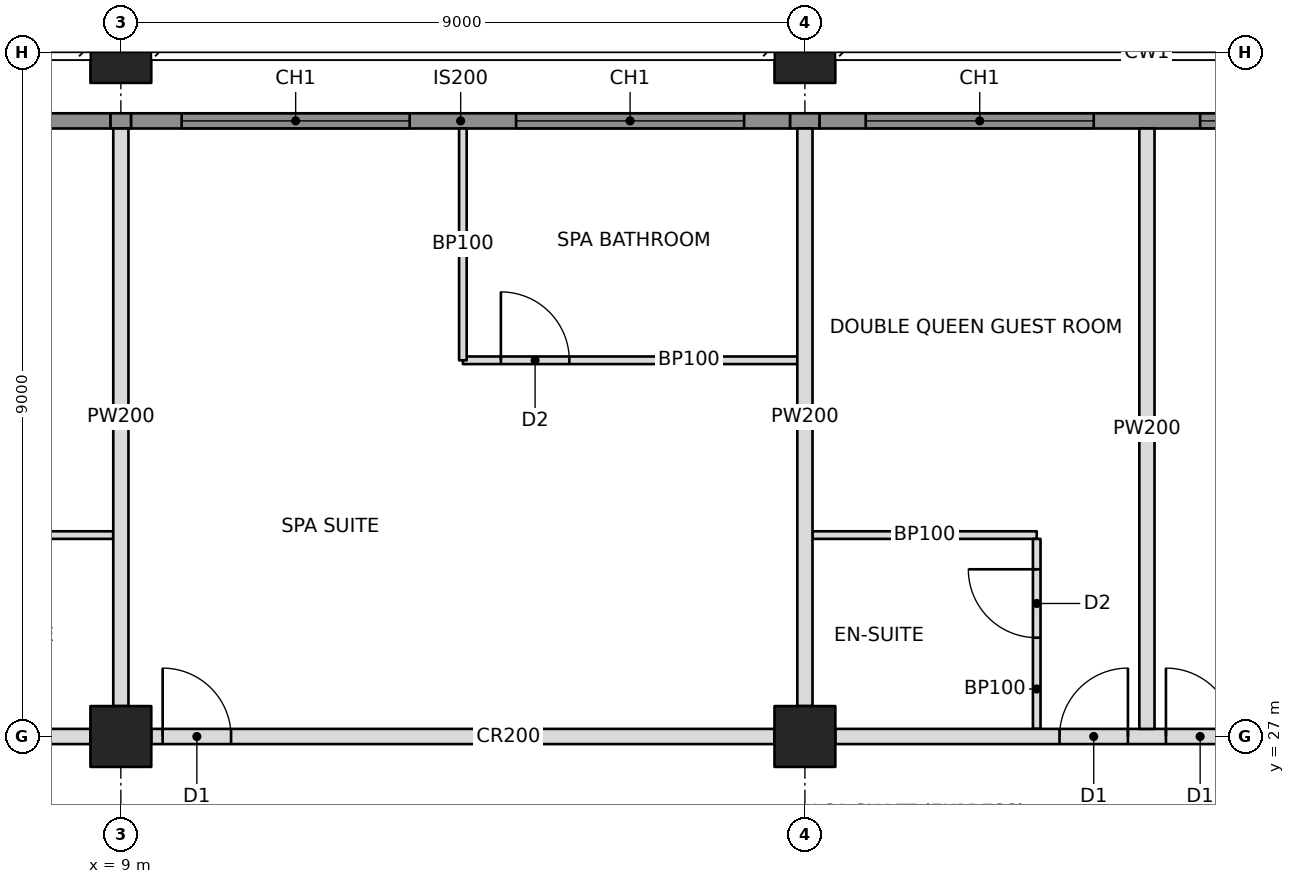
"""IFC4 building model, lengths in metres.
Left out: names, types, materials, properties, quantities, classifications, styles, units other than length and angle.
Written with IfcOpenShell. Run it as: python <this file> out.ifc"""

import sys

from ifc_helpers import new_model, si_unit, direction, frame, frame_2d, origin, origin_2d, place, context, subcontext, project, spatial, rectangle, hollow_rectangle, extrude, element, fill, save


model = new_model("IFC4")
c1 = context("Model", 3, precision=1e-05, world=origin(), true_north=direction((0.0, 1.0)))
c2 = subcontext(c1, "Body", "Model", "MODEL_VIEW")
j1 = project(units=[si_unit("LENGTHUNIT", "METRE"), si_unit("PLANEANGLEUNIT", "RADIAN")], contexts=[c1])
p1 = place(None, origin())
s1 = spatial("IfcSite", under=j1, at=p1, CompositionType="ELEMENT")
p2 = place(p1, origin())
s2 = spatial("IfcBuilding", under=s1, at=p2, CompositionType="ELEMENT")
p3 = place(p2, frame((0.0, 0.0, 148.6)))
s3 = spatial("IfcBuildingStorey", under=s2, at=p3, CompositionType="ELEMENT", Elevation=148.6)
p4 = place(p3, frame((9.0, 27.0, 0.0), z_axis=(0.0, 0.0, 1.0), x_axis=(1.0, 0.0, 0.0)))
e1 = element("IfcColumn", 1, at=p4, inside=s3, PredefinedType="COLUMN", context=c2, shape_type="SweptSolid", body=[
    extrude(hollow_rectangle(XDim=0.8, YDim=0.8, WallThickness=0.07, at=origin_2d()), origin(), (0.0, 0.0, 1.0), 3.4),
])
p5 = place(p3, frame((9.0, 36.0, 0.0), z_axis=(0.0, 0.0, 1.0), x_axis=(1.0, 0.0, 0.0)))
e2 = element("IfcColumn", 2, at=p5, inside=s3, PredefinedType="COLUMN", context=c2, shape_type="SweptSolid", body=[
    extrude(hollow_rectangle(XDim=0.8, YDim=0.8, WallThickness=0.06, at=origin_2d()), origin(), (0.0, 0.0, 1.0), 3.4),
])
p6 = place(p3, frame((18.0, 27.0, 0.0), z_axis=(0.0, 0.0, 1.0), x_axis=(1.0, 0.0, 0.0)))
e3 = element("IfcColumn", 3, at=p6, inside=s3, PredefinedType="COLUMN", context=c2, shape_type="SweptSolid", body=[
    extrude(hollow_rectangle(XDim=0.8, YDim=0.8, WallThickness=0.07, at=origin_2d()), origin(), (0.0, 0.0, 1.0), 3.4),
])
p7 = place(p3, frame((18.0, 36.0, 0.0), z_axis=(0.0, 0.0, 1.0), x_axis=(1.0, 0.0, 0.0)))
e4 = element("IfcColumn", 4, at=p7, inside=s3, PredefinedType="COLUMN", context=c2, shape_type="SweptSolid", body=[
    extrude(hollow_rectangle(XDim=0.8, YDim=0.8, WallThickness=0.06, at=origin_2d()), origin(), (0.0, 0.0, 1.0), 3.4),
])
p8 = place(p3, frame((3.0, 35.1, 0.0), z_axis=(0.0, 0.0, 1.0), x_axis=(1.0, 0.0, 0.0)))
e5 = element("IfcWall", 5, at=p8, inside=s3, PredefinedType="SOLIDWALL", context=c2, shape_type="SweptSolid", body=[
    extrude(rectangle(XDim=5.865, YDim=0.2, at=frame_2d((2.932, 0.0))), origin(), (0.0, 0.0, 1.0), 3.2),
])
p9 = place(p8, frame((1.45, 0.0, 0.6)))
e6 = element("IfcOpeningElement", 6, at=p9, cuts=e5, PredefinedType="OPENING", context=c2, shape_type="SweptSolid", body=[
    extrude(rectangle(XDim=3.0, YDim=2.2, at=frame_2d((1.5, 1.1))), frame((0.0, 0.11, 0.0), z_axis=(0.0, -1.0, 0.0), x_axis=(1.0, 0.0, 0.0)), (0.0, 0.0, 1.0), 0.22),
])
p10 = place(p3, frame((1.0, 27.0, 0.0), z_axis=(0.0, 0.0, 1.0), x_axis=(1.0, 0.0, 0.0)))
e7 = element("IfcWall", 7, at=p10, inside=s3, PredefinedType="PARTITIONING", context=c2, shape_type="SweptSolid", body=[
    extrude(rectangle(XDim=7.6, YDim=0.2, at=frame_2d((3.8, 0.0))), origin(), (0.0, 0.0, 1.0), 2.438),
])
p11 = place(p10, frame((0.25, 0.0, 0.0)))
e8 = element("IfcOpeningElement", 8, at=p11, cuts=e7, PredefinedType="OPENING", context=c2, shape_type="SweptSolid", body=[
    extrude(rectangle(XDim=0.9, YDim=2.1, at=frame_2d((0.45, 1.05))), frame((0.0, 0.11, 0.0), z_axis=(0.0, -1.0, 0.0), x_axis=(1.0, 0.0, 0.0)), (0.0, 0.0, 1.0), 0.22),
])
p12 = place(p3, frame((9.4, 27.0, 0.0), z_axis=(0.0, 0.0, 1.0), x_axis=(1.0, 0.0, 0.0)))
e9 = element("IfcWall", 9, at=p12, inside=s3, PredefinedType="PARTITIONING", context=c2, shape_type="SweptSolid", body=[
    extrude(rectangle(XDim=8.2, YDim=0.2, at=frame_2d((4.1, 0.0))), origin(), (0.0, 0.0, 1.0), 2.405),
])
p13 = place(p12, frame((0.15, 0.0, 0.0)))
e10 = element("IfcOpeningElement", 10, at=p13, cuts=e9, PredefinedType="OPENING", context=c2, shape_type="SweptSolid", body=[
    extrude(rectangle(XDim=0.9, YDim=2.1, at=frame_2d((0.45, 1.05))), frame((0.0, 0.11, 0.0), z_axis=(0.0, -1.0, 0.0), x_axis=(1.0, 0.0, 0.0)), (0.0, 0.0, 1.0), 0.22),
])
p14 = place(p3, frame((18.4, 27.0, 0.0), z_axis=(0.0, 0.0, 1.0), x_axis=(1.0, 0.0, 0.0)))
e11 = element("IfcWall", 11, at=p14, inside=s3, PredefinedType="PARTITIONING", context=c2, shape_type="SweptSolid", body=[
    extrude(rectangle(XDim=8.2, YDim=0.2, at=frame_2d((4.1, 0.0))), origin(), (0.0, 0.0, 1.0), 2.405),
])
p15 = place(p14, frame((2.95, 0.0, 0.0)))
e12 = element("IfcOpeningElement", 12, at=p15, cuts=e11, PredefinedType="OPENING", context=c2, shape_type="SweptSolid", body=[
    extrude(rectangle(XDim=0.9, YDim=2.1, at=frame_2d((0.45, 1.05))), frame((0.0, 0.11, 0.0), z_axis=(0.0, -1.0, 0.0), x_axis=(1.0, 0.0, 0.0)), (0.0, 0.0, 1.0), 0.22),
])
p16 = place(p14, frame((4.35, 0.0, 0.0)))
e13 = element("IfcOpeningElement", 13, at=p16, cuts=e11, PredefinedType="OPENING", context=c2, shape_type="SweptSolid", body=[
    extrude(rectangle(XDim=0.9, YDim=2.1, at=frame_2d((0.45, 1.05))), frame((0.0, 0.11, 0.0), z_axis=(0.0, -1.0, 0.0), x_axis=(1.0, 0.0, 0.0)), (0.0, 0.0, 1.0), 0.22),
])
p17 = place(p3, frame((9.0, 27.4, 0.0), z_axis=(0.0, 0.0, 1.0), x_axis=(0.0, 1.0, 0.0)))
e14 = element("IfcWall", 14, at=p17, inside=s3, PredefinedType="PARTITIONING", context=c2, shape_type="SweptSolid", body=[
    extrude(rectangle(XDim=7.6, YDim=0.2, at=frame_2d((3.8, 0.0))), origin(), (0.0, 0.0, 1.0), 2.438),
])
p18 = place(p3, frame((18.0, 27.4, 0.0), z_axis=(0.0, 0.0, 1.0), x_axis=(0.0, 1.0, 0.0)))
e15 = element("IfcWall", 15, at=p18, inside=s3, PredefinedType="PARTITIONING", context=c2, shape_type="SweptSolid", body=[
    extrude(rectangle(XDim=7.6, YDim=0.2, at=frame_2d((3.8, 0.0))), origin(), (0.0, 0.0, 1.0), 2.405),
])
p19 = place(p3, frame((22.5, 27.1, 0.0), z_axis=(0.0, 0.0, 1.0), x_axis=(0.0, 1.0, 0.0)))
e16 = element("IfcWall", 16, at=p19, inside=s3, PredefinedType="PARTITIONING", context=c2, shape_type="SweptSolid", body=[
    extrude(rectangle(XDim=7.9, YDim=0.2, at=frame_2d((3.95, 0.0))), origin(), (0.0, 0.0, 1.0), 2.404),
])
p20 = place(p3, frame((5.45, 29.65, 0.0), z_axis=(0.0, 0.0, 1.0), x_axis=(1.0, 0.0, 0.0)))
e17 = element("IfcWall", 17, at=p20, inside=s3, PredefinedType="PARTITIONING", context=c2, shape_type="SweptSolid", body=[
    extrude(rectangle(XDim=3.45, YDim=0.1, at=frame_2d((1.725, 0.0))), origin(), (0.0, 0.0, 1.0), 2.438),
])
p21 = place(p3, frame((13.5, 31.95, 0.0), z_axis=(0.0, 0.0, 1.0), x_axis=(1.0, 0.0, 0.0)))
e18 = element("IfcWall", 18, at=p21, inside=s3, PredefinedType="PARTITIONING", context=c2, shape_type="SweptSolid", body=[
    extrude(rectangle(XDim=4.4, YDim=0.1, at=frame_2d((2.2, 0.0))), origin(), (0.0, 0.0, 1.0), 2.404),
])
p22 = place(p21, frame((0.5, 0.0, 0.0)))
e19 = element("IfcOpeningElement", 19, at=p22, cuts=e18, PredefinedType="OPENING", context=c2, shape_type="SweptSolid", body=[
    extrude(rectangle(XDim=0.9, YDim=2.1, at=frame_2d((0.45, 1.05))), frame((0.0, 0.06, 0.0), z_axis=(0.0, -1.0, 0.0), x_axis=(1.0, 0.0, 0.0)), (0.0, 0.0, 1.0), 0.12),
])
p23 = place(p3, frame((13.5, 31.95, 0.0), z_axis=(0.0, 0.0, 1.0), x_axis=(0.0, 1.0, 0.0)))
e20 = element("IfcWall", 20, at=p23, inside=s3, PredefinedType="PARTITIONING", context=c2, shape_type="SweptSolid", body=[
    extrude(rectangle(XDim=3.05, YDim=0.1, at=frame_2d((1.525, 0.0))), origin(), (0.0, 0.0, 1.0), 3.2),
])
p24 = place(p3, frame((18.1, 29.65, 0.0), z_axis=(0.0, 0.0, 1.0), x_axis=(1.0, 0.0, 0.0)))
e21 = element("IfcWall", 21, at=p24, inside=s3, PredefinedType="PARTITIONING", context=c2, shape_type="SweptSolid", body=[
    extrude(rectangle(XDim=2.95, YDim=0.1, at=frame_2d((1.475, 0.0))), origin(), (0.0, 0.0, 1.0), 2.404),
])
p25 = place(p3, frame((21.05, 27.1, 0.0), z_axis=(0.0, 0.0, 1.0), x_axis=(0.0, 1.0, 0.0)))
e22 = element("IfcWall", 22, at=p25, inside=s3, PredefinedType="PARTITIONING", context=c2, shape_type="SweptSolid", body=[
    extrude(rectangle(XDim=2.5, YDim=0.1, at=frame_2d((1.25, 0.0))), origin(), (0.0, 0.0, 1.0), 2.404),
])
p26 = place(p25, frame((1.2, 0.0, 0.0)))
e23 = element("IfcOpeningElement", 23, at=p26, cuts=e22, PredefinedType="OPENING", context=c2, shape_type="SweptSolid", body=[
    extrude(rectangle(XDim=0.9, YDim=2.1, at=frame_2d((0.45, 1.05))), frame((0.0, 0.06, 0.0), z_axis=(0.0, -1.0, 0.0), x_axis=(1.0, 0.0, 0.0)), (0.0, 0.0, 1.0), 0.12),
])
p27 = place(p3, frame((8.865, 35.1, 0.0), z_axis=(0.0, 0.0, 1.0), x_axis=(1.0, 0.0, 0.0)))
e24 = element("IfcWall", 24, at=p27, inside=s3, PredefinedType="SOLIDWALL", context=c2, shape_type="SweptSolid", body=[
    extrude(rectangle(XDim=0.271, YDim=0.2, at=frame_2d((0.135, 0.0))), origin(), (0.0, 0.0, 1.0), 2.438),
])
p28 = place(p3, frame((9.135, 35.1, 0.0), z_axis=(0.0, 0.0, 1.0), x_axis=(1.0, 0.0, 0.0)))
e25 = element("IfcWall", 25, at=p28, inside=s3, PredefinedType="SOLIDWALL", context=c2, shape_type="SweptSolid", body=[
    extrude(rectangle(XDim=8.671, YDim=0.2, at=frame_2d((4.335, 0.0))), origin(), (0.0, 0.0, 1.0), 3.2),
])
p29 = place(p28, frame((0.665, 0.0, 0.6)))
e26 = element("IfcOpeningElement", 26, at=p29, cuts=e25, PredefinedType="OPENING", context=c2, shape_type="SweptSolid", body=[
    extrude(rectangle(XDim=3.0, YDim=2.2, at=frame_2d((1.5, 1.1))), frame((0.0, 0.11, 0.0), z_axis=(0.0, -1.0, 0.0), x_axis=(1.0, 0.0, 0.0)), (0.0, 0.0, 1.0), 0.22),
])
p30 = place(p28, frame((5.065, 0.0, 0.6)))
e27 = element("IfcOpeningElement", 27, at=p30, cuts=e25, PredefinedType="OPENING", context=c2, shape_type="SweptSolid", body=[
    extrude(rectangle(XDim=3.0, YDim=2.2, at=frame_2d((1.5, 1.1))), frame((0.0, 0.11, 0.0), z_axis=(0.0, -1.0, 0.0), x_axis=(1.0, 0.0, 0.0)), (0.0, 0.0, 1.0), 0.22),
])
p31 = place(p3, frame((17.806, 35.1, 0.0), z_axis=(0.0, 0.0, 1.0), x_axis=(1.0, 0.0, 0.0)))
e28 = element("IfcWall", 28, at=p31, inside=s3, PredefinedType="SOLIDWALL", context=c2, shape_type="SweptSolid", body=[
    extrude(rectangle(XDim=0.388, YDim=0.2, at=frame_2d((0.194, 0.0))), origin(), (0.0, 0.0, 1.0), 2.404),
])
p32 = place(p3, frame((18.194, 35.1, 0.0), z_axis=(0.0, 0.0, 1.0), x_axis=(1.0, 0.0, 0.0)))
e29 = element("IfcWall", 29, at=p32, inside=s3, PredefinedType="SOLIDWALL", context=c2, shape_type="SweptSolid", body=[
    extrude(rectangle(XDim=8.612, YDim=0.2, at=frame_2d((4.306, 0.0))), origin(), (0.0, 0.0, 1.0), 3.2),
])
p33 = place(p32, frame((0.606, 0.0, 0.6)))
e30 = element("IfcOpeningElement", 30, at=p33, cuts=e29, PredefinedType="OPENING", context=c2, shape_type="SweptSolid", body=[
    extrude(rectangle(XDim=3.0, YDim=2.2, at=frame_2d((1.5, 1.1))), frame((0.0, 0.11, 0.0), z_axis=(0.0, -1.0, 0.0), x_axis=(1.0, 0.0, 0.0)), (0.0, 0.0, 1.0), 0.22),
])
p34 = place(p32, frame((5.006, 0.0, 0.6)))
e31 = element("IfcOpeningElement", 31, at=p34, cuts=e29, PredefinedType="OPENING", context=c2, shape_type="SweptSolid", body=[
    extrude(rectangle(XDim=3.0, YDim=2.2, at=frame_2d((1.5, 1.1))), frame((0.0, 0.11, 0.0), z_axis=(0.0, -1.0, 0.0), x_axis=(1.0, 0.0, 0.0)), (0.0, 0.0, 1.0), 0.22),
])
p35 = place(p29, origin())
e32 = element("IfcWindow", 32, at=p35, inside=s3, PartitioningType="TRIPLE_PANEL_VERTICAL", PredefinedType="WINDOW", context=c2, shape_type="SweptSolid", body=[
    extrude(rectangle(XDim=3.0, YDim=2.2, at=frame_2d((1.5, 1.1))), frame((0.0, 0.03, 0.0), z_axis=(0.0, -1.0, 0.0), x_axis=(1.0, 0.0, 0.0)), (0.0, 0.0, 1.0), 0.06),
])
fill(e26, e32)
p36 = place(p30, origin())
e33 = element("IfcWindow", 33, at=p36, inside=s3, PartitioningType="TRIPLE_PANEL_VERTICAL", PredefinedType="WINDOW", context=c2, shape_type="SweptSolid", body=[
    extrude(rectangle(XDim=3.0, YDim=2.2, at=frame_2d((1.5, 1.1))), frame((0.0, 0.03, 0.0), z_axis=(0.0, -1.0, 0.0), x_axis=(1.0, 0.0, 0.0)), (0.0, 0.0, 1.0), 0.06),
])
fill(e27, e33)
p37 = place(p33, origin())
e34 = element("IfcWindow", 34, at=p37, inside=s3, PartitioningType="TRIPLE_PANEL_VERTICAL", PredefinedType="WINDOW", context=c2, shape_type="SweptSolid", body=[
    extrude(rectangle(XDim=3.0, YDim=2.2, at=frame_2d((1.5, 1.1))), frame((0.0, 0.03, 0.0), z_axis=(0.0, -1.0, 0.0), x_axis=(1.0, 0.0, 0.0)), (0.0, 0.0, 1.0), 0.06),
])
fill(e30, e34)
p38 = place(p34, origin())
e35 = element("IfcWindow", 35, at=p38, inside=s3, PartitioningType="TRIPLE_PANEL_VERTICAL", PredefinedType="WINDOW", context=c2, shape_type="SweptSolid", body=[
    extrude(rectangle(XDim=3.0, YDim=2.2, at=frame_2d((1.5, 1.1))), frame((0.0, 0.03, 0.0), z_axis=(0.0, -1.0, 0.0), x_axis=(1.0, 0.0, 0.0)), (0.0, 0.0, 1.0), 0.06),
])
fill(e31, e35)
p39 = place(p22, origin())
e36 = element("IfcDoor", 36, at=p39, inside=s3, OperationType="SINGLE_SWING_LEFT", PredefinedType="DOOR", context=c2, shape_type="SweptSolid", body=[
    extrude(rectangle(XDim=0.9, YDim=2.1, at=frame_2d((0.45, 1.05))), frame((0.0, 0.025, 0.0), z_axis=(0.0, -1.0, 0.0), x_axis=(1.0, 0.0, 0.0)), (0.0, 0.0, 1.0), 0.05),
])
fill(e19, e36)
p40 = place(p13, origin())
e37 = element("IfcDoor", 37, at=p40, inside=s3, OperationType="SINGLE_SWING_LEFT", PredefinedType="DOOR", context=c2, shape_type="SweptSolid", body=[
    extrude(rectangle(XDim=0.9, YDim=2.1, at=frame_2d((0.45, 1.05))), frame((0.0, 0.025, 0.0), z_axis=(0.0, -1.0, 0.0), x_axis=(1.0, 0.0, 0.0)), (0.0, 0.0, 1.0), 0.05),
])
fill(e10, e37)
p41 = place(p26, origin())
e38 = element("IfcDoor", 38, at=p41, inside=s3, OperationType="SINGLE_SWING_RIGHT", PredefinedType="DOOR", context=c2, shape_type="SweptSolid", body=[
    extrude(rectangle(XDim=0.9, YDim=2.1, at=frame_2d((0.45, 1.05))), frame((0.0, 0.025, 0.0), z_axis=(0.0, -1.0, 0.0), x_axis=(1.0, 0.0, 0.0)), (0.0, 0.0, 1.0), 0.05),
])
fill(e23, e38)
p42 = place(p15, origin())
e39 = element("IfcDoor", 39, at=p42, inside=s3, OperationType="SINGLE_SWING_RIGHT", PredefinedType="DOOR", context=c2, shape_type="SweptSolid", body=[
    extrude(rectangle(XDim=0.9, YDim=2.1, at=frame_2d((0.45, 1.05))), frame((0.0, 0.025, 0.0), z_axis=(0.0, -1.0, 0.0), x_axis=(1.0, 0.0, 0.0)), (0.0, 0.0, 1.0), 0.05),
])
fill(e12, e39)
p43 = place(p16, origin())
e40 = element("IfcDoor", 40, at=p43, inside=s3, OperationType="SINGLE_SWING_LEFT", PredefinedType="DOOR", context=c2, shape_type="SweptSolid", body=[
    extrude(rectangle(XDim=0.9, YDim=2.1, at=frame_2d((0.45, 1.05))), frame((0.0, 0.025, 0.0), z_axis=(0.0, -1.0, 0.0), x_axis=(1.0, 0.0, 0.0)), (0.0, 0.0, 1.0), 0.05),
])
fill(e13, e40)
save(model, sys.argv[1])
